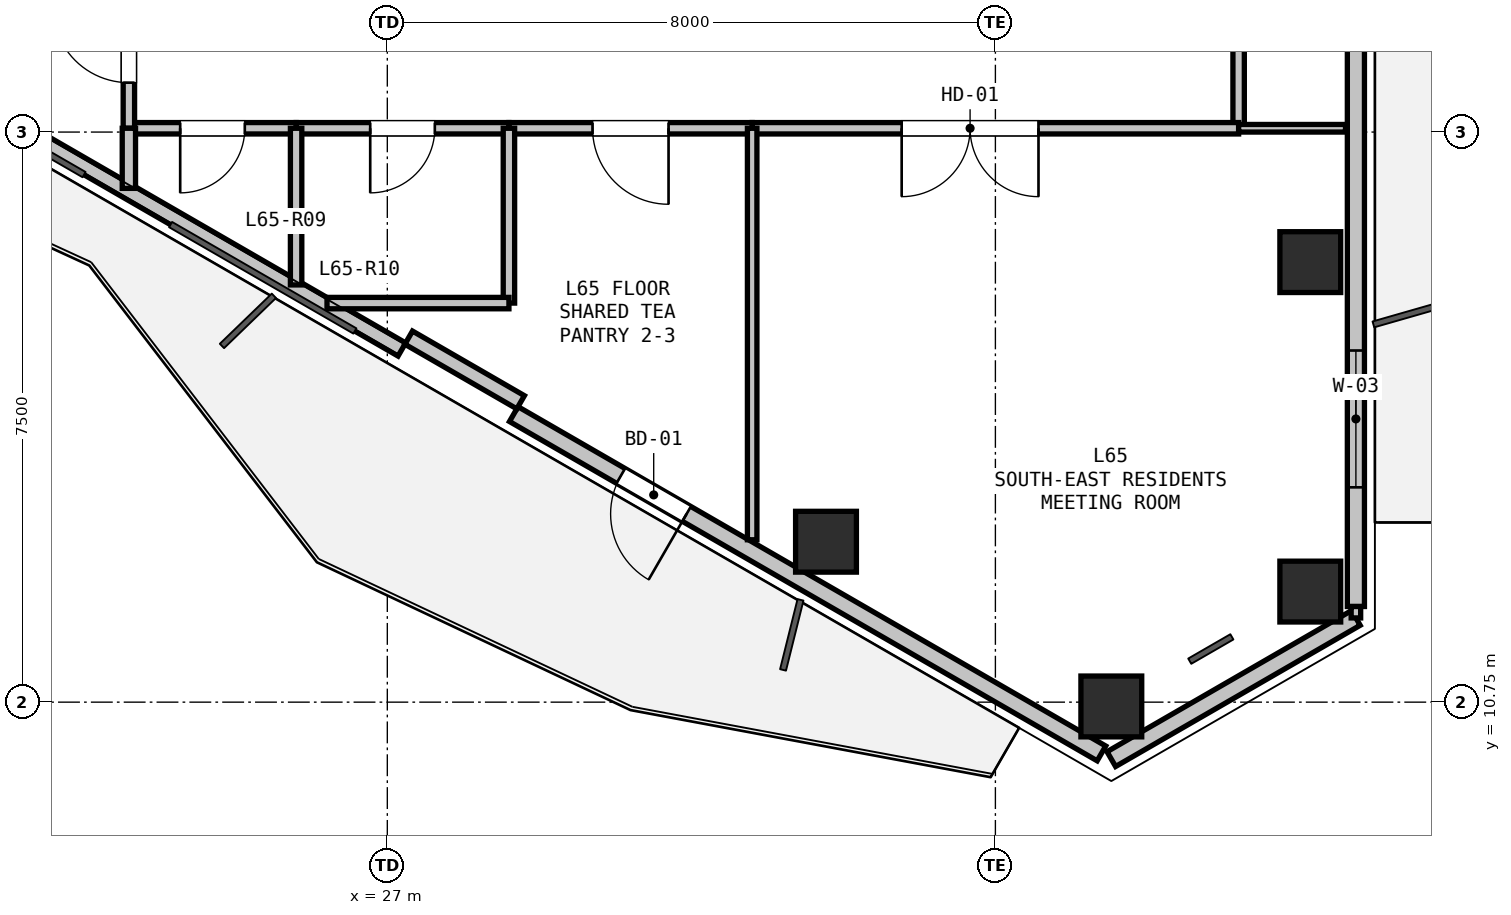
"""IFC4 building model, lengths in metres.
Left out: names, types, materials, properties, quantities, classifications, styles, units other than length and angle.
Written with IfcOpenShell. Run it as: python <this file> out.ifc"""

import sys

from ifc_helpers import new_model, si_unit, direction, frame, frame_2d, origin, origin_2d, place, context, subcontext, project, spatial, rectangle, hollow_rectangle, extrude, element, fill, save


model = new_model("IFC4")
c1 = context("Model", 3, precision=1e-05, world=origin(), true_north=direction((0.0, 1.0)))
c2 = subcontext(c1, "Body", "Model", "MODEL_VIEW")
j1 = project(units=[si_unit("LENGTHUNIT", "METRE"), si_unit("PLANEANGLEUNIT", "RADIAN")], contexts=[c1])
p1 = place(None, origin())
s1 = spatial("IfcSite", under=j1, at=p1, CompositionType="ELEMENT")
p2 = place(p1, origin())
s2 = spatial("IfcBuilding", under=s1, at=p2, CompositionType="ELEMENT")
p3 = place(p2, frame((0.0, 0.0, 233.1)))
s3 = spatial("IfcBuildingStorey", under=s2, at=p3, CompositionType="ELEMENT", Elevation=233.1)
for number, where, z_axis, x_axis in (
    (1, (39.143, 16.539, 0.0), (0.0, 0.0, 1.0), (1.0, 0.0, 0.0)),
    (2, (39.143, 12.205, 0.0), (0.0, 0.0, 1.0), (1.0, 0.0, 0.0)),
    (3, (36.525, 10.693, 0.0), (0.0, 0.0, 1.0), (1.0, 0.0, 0.0)),
    (4, (32.771, 12.861, 0.0), (0.0, 0.0, 1.0), (1.0, 0.0, 0.0)),
):
    element("IfcColumn", number, at=place(p3, frame(where, z_axis=z_axis, x_axis=x_axis)), inside=s3, PredefinedType="COLUMN", context=c2, shape_type="SweptSolid", body=[
        extrude(hollow_rectangle(XDim=0.8, YDim=0.8, WallThickness=0.025, at=origin_2d()), origin(), (0.0, 0.0, 1.0), 3.3),
    ])
p4 = place(p3, frame((39.743, 11.858, 0.0), z_axis=(0.0, 0.0, 1.0), x_axis=(-0.866038962515, -0.499976514854, 0.0)))
e5 = element("IfcWall", 5, at=p4, inside=s3, PredefinedType="SOLIDWALL", context=c2, shape_type="SweptSolid", body=[
    extrude(rectangle(XDim=3.716, YDim=0.225, at=frame_2d((1.858, 0.0))), origin(), (0.0, 0.0, 1.0), 2.7),
])
p5 = place(p3, frame((39.743, 20.936, 0.0), z_axis=(0.0, 0.0, 1.0), x_axis=(0.0, -1.0, 0.0)))
e6 = element("IfcWall", 6, at=p5, inside=s3, PredefinedType="SOLIDWALL", context=c2, shape_type="SweptSolid", body=[
    extrude(rectangle(XDim=8.928, YDim=0.225, at=frame_2d((4.464, 0.0))), origin(), (0.0, 0.0, 1.0), 2.7),
])
p6 = place(p5, frame((5.56, 0.0, 0.9)))
e7 = element("IfcOpeningElement", 7, at=p6, cuts=e6, PredefinedType="OPENING", context=c2, shape_type="SweptSolid", body=[
    extrude(rectangle(XDim=1.8, YDim=1.5, at=frame_2d((0.9, 0.75))), frame((0.0, 0.123, 0.0), z_axis=(0.0, -1.0, 0.0), x_axis=(1.0, 0.0, 0.0)), (0.0, 0.0, 1.0), 0.245),
])
p7 = place(p3, frame((36.395, 10.076, 0.0), z_axis=(0.0, 0.0, 1.0), x_axis=(-0.866026655105, 0.499997832642, 0.0)))
e8 = element("IfcWall", 8, at=p7, inside=s3, PredefinedType="SOLIDWALL", context=c2, shape_type="SweptSolid", body=[
    extrude(rectangle(XDim=8.928, YDim=0.225, at=frame_2d((4.464, 0.0))), origin(), (0.0, 0.0, 1.0), 2.7),
])
p8 = place(p7, frame((6.302, 0.0, 0.0)))
e9 = element("IfcOpeningElement", 9, at=p8, cuts=e8, PredefinedType="OPENING", context=c2, shape_type="SweptSolid", body=[
    extrude(rectangle(XDim=1.0, YDim=2.1, at=frame_2d((0.5, 1.05))), frame((0.0, 0.123, 0.0), z_axis=(0.0, -1.0, 0.0), x_axis=(1.0, 0.0, 0.0)), (0.0, 0.0, 1.0), 0.245),
])
p9 = place(p3, frame((27.191, 15.389, 0.0), z_axis=(0.0, 0.0, 1.0), x_axis=(-0.866019557082, 0.500010126649, 0.0)))
e10 = element("IfcWall", 10, at=p9, inside=s3, PredefinedType="PARAPET", context=c2, shape_type="SweptSolid", body=[
    extrude(rectangle(XDim=8.228, YDim=0.2, at=frame_2d((4.114, 0.0))), origin(), (0.0, 0.0, 1.0), 0.2),
])
p10 = place(p3, frame((28.754, 14.695, 0.0), z_axis=(0.0, 0.0, 1.0), x_axis=(-0.866025371046, 0.500000056704, 0.0)))
e11 = element("IfcWall", 11, at=p10, inside=s3, PredefinedType="PARAPET", context=c2, shape_type="SweptSolid", body=[
    extrude(rectangle(XDim=1.7, YDim=0.2, at=frame_2d((0.85, 0.0))), origin(), (0.0, 0.0, 1.0), 2.7),
])
p11 = place(p3, frame((38.2, 19.9, 0.0), z_axis=(0.0, 0.0, 1.0), x_axis=(0.0, -1.0, 0.0)))
e12 = element("IfcWall", 12, at=p11, inside=s3, PredefinedType="PARTITIONING", context=c2, shape_type="SweptSolid", body=[
    extrude(rectangle(XDim=1.6, YDim=0.15, at=frame_2d((0.8, 0.0))), origin(), (0.0, 0.0, 1.0), 3.08),
])
p12 = place(p3, frame((38.2, 18.3, 0.0), z_axis=(0.0, 0.0, 1.0), x_axis=(-1.0, 0.0, 0.0)))
e13 = element("IfcWall", 13, at=p12, inside=s3, PredefinedType="PARTITIONING", context=c2, shape_type="SweptSolid", body=[
    extrude(rectangle(XDim=6.4, YDim=0.15, at=frame_2d((3.2, 0.0))), origin(), (0.0, 0.0, 1.0), 2.528),
])
p13 = place(p12, frame((2.633, 0.0, 0.0)))
e14 = element("IfcOpeningElement", 14, at=p13, cuts=e13, PredefinedType="OPENING", context=c2, shape_type="SweptSolid", body=[
    extrude(rectangle(XDim=1.8, YDim=2.2, at=frame_2d((0.9, 1.1))), frame((0.0, 0.085, 0.0), z_axis=(0.0, -1.0, 0.0), x_axis=(1.0, 0.0, 0.0)), (0.0, 0.0, 1.0), 0.17),
])
p14 = place(p3, frame((31.8, 18.3, 0.0), z_axis=(0.0, 0.0, 1.0), x_axis=(-1.0, 0.0, 0.0)))
e15 = element("IfcWall", 15, at=p14, inside=s3, PredefinedType="PARTITIONING", context=c2, shape_type="SweptSolid", body=[
    extrude(rectangle(XDim=3.2, YDim=0.15, at=frame_2d((1.6, 0.0))), origin(), (0.0, 0.0, 1.0), 3.08),
])
p15 = place(p14, frame((1.1, 0.0, 0.0)))
e16 = element("IfcOpeningElement", 16, at=p15, cuts=e15, PredefinedType="OPENING", context=c2, shape_type="SweptSolid", body=[
    extrude(rectangle(XDim=1.0, YDim=2.15, at=frame_2d((0.5, 1.075))), frame((0.0, 0.085, 0.0), z_axis=(0.0, -1.0, 0.0), x_axis=(1.0, 0.0, 0.0)), (0.0, 0.0, 1.0), 0.17),
])
p16 = place(p3, frame((28.6, 18.3, 0.0), z_axis=(0.0, 0.0, 1.0), x_axis=(-1.0, 0.0, 0.0)))
e17 = element("IfcWall", 17, at=p16, inside=s3, PredefinedType="PARTITIONING", context=c2, shape_type="SweptSolid", body=[
    extrude(rectangle(XDim=2.8, YDim=0.15, at=frame_2d((1.4, 0.0))), origin(), (0.0, 0.0, 1.0), 3.08),
])
p17 = place(p16, frame((0.975, 0.0, 0.0)))
e18 = element("IfcOpeningElement", 18, at=p17, cuts=e17, PredefinedType="OPENING", context=c2, shape_type="SweptSolid", body=[
    extrude(rectangle(XDim=0.85, YDim=2.1, at=frame_2d((0.425, 1.05))), frame((0.0, 0.085, 0.0), z_axis=(0.0, -1.0, 0.0), x_axis=(1.0, 0.0, 0.0)), (0.0, 0.0, 1.0), 0.17),
])
p18 = place(p3, frame((25.8, 18.3, 0.0), z_axis=(0.0, 0.0, 1.0), x_axis=(-1.0, 0.0, 0.0)))
e19 = element("IfcWall", 19, at=p18, inside=s3, PredefinedType="PARTITIONING", context=c2, shape_type="SweptSolid", body=[
    extrude(rectangle(XDim=2.2, YDim=0.15, at=frame_2d((1.1, 0.0))), origin(), (0.0, 0.0, 1.0), 2.365),
])
p19 = place(p18, frame((0.675, 0.0, 0.0)))
e20 = element("IfcOpeningElement", 20, at=p19, cuts=e19, PredefinedType="OPENING", context=c2, shape_type="SweptSolid", body=[
    extrude(rectangle(XDim=0.85, YDim=2.1, at=frame_2d((0.425, 1.05))), frame((0.0, 0.085, 0.0), z_axis=(0.0, -1.0, 0.0), x_axis=(1.0, 0.0, 0.0)), (0.0, 0.0, 1.0), 0.17),
])
p20 = place(p3, frame((23.6, 18.3, 0.0), z_axis=(0.0, 0.0, 1.0), x_axis=(0.0, 1.0, 0.0)))
e21 = element("IfcWall", 21, at=p20, inside=s3, PredefinedType="PARTITIONING", context=c2, shape_type="SweptSolid", body=[
    extrude(rectangle(XDim=2.2, YDim=0.15, at=frame_2d((1.1, 0.0))), origin(), (0.0, 0.0, 1.0), 2.528),
])
p21 = place(p20, frame((0.6, 0.0, 0.0)))
e22 = element("IfcOpeningElement", 22, at=p21, cuts=e21, PredefinedType="OPENING", context=c2, shape_type="SweptSolid", body=[
    extrude(rectangle(XDim=1.0, YDim=2.15, at=frame_2d((0.5, 1.075))), frame((0.0, 0.085, 0.0), z_axis=(0.0, -1.0, 0.0), x_axis=(1.0, 0.0, 0.0)), (0.0, 0.0, 1.0), 0.17),
])
p22 = place(p3, frame((25.8, 18.3, 0.0), z_axis=(0.0, 0.0, 1.0), x_axis=(0.0, -1.0, 0.0)))
e23 = element("IfcWall", 23, at=p22, inside=s3, PredefinedType="PARTITIONING", context=c2, shape_type="SweptSolid", body=[
    extrude(rectangle(XDim=2.061, YDim=0.15, at=frame_2d((1.031, 0.0))), origin(), (0.0, 0.0, 1.0), 2.365),
])
p23 = place(p3, frame((23.6, 17.509, 0.0), z_axis=(0.0, 0.0, 1.0), x_axis=(0.0, 1.0, 0.0)))
e24 = element("IfcWall", 24, at=p23, inside=s3, PredefinedType="PLUMBINGWALL", context=c2, shape_type="SweptSolid", body=[
    extrude(rectangle(XDim=0.791, YDim=0.175, at=frame_2d((0.396, 0.0))), origin(), (0.0, 0.0, 1.0), 2.365),
])
p24 = place(p3, frame((31.8, 12.886, 0.0), z_axis=(0.0, 0.0, 1.0), x_axis=(0.0, 1.0, 0.0)))
e25 = element("IfcWall", 25, at=p24, inside=s3, PredefinedType="PARTITIONING", context=c2, shape_type="SweptSolid", body=[
    extrude(rectangle(XDim=5.414, YDim=0.125, at=frame_2d((2.707, 0.0))), origin(), (0.0, 0.0, 1.0), 2.365),
])
p25 = place(p3, frame((38.2, 18.3, 0.0), z_axis=(0.0, 0.0, 1.0), x_axis=(1.0, 0.0, 0.0)))
e26 = element("IfcWall", 26, at=p25, inside=s3, PredefinedType="PARTITIONING", context=c2, shape_type="SweptSolid", body=[
    extrude(rectangle(XDim=1.406, YDim=0.1, at=frame_2d((0.703, 0.0))), origin(), (0.0, 0.0, 1.0), 2.365),
])
p26 = place(p3, frame((39.743, 12.008, 0.0), z_axis=(0.0, 0.0, 1.0), x_axis=(0.0, -1.0, 0.0)))
e27 = element("IfcWall", 27, at=p26, inside=s3, PredefinedType="PARTITIONING", context=c2, shape_type="SweptSolid", body=[
    extrude(rectangle(XDim=0.15, YDim=0.125, at=frame_2d((0.075, 0.0))), origin(), (0.0, 0.0, 1.0), 3.08),
])
p27 = place(p3, frame((28.6, 18.3, 0.0), z_axis=(0.0, 0.0, 1.0), x_axis=(0.0, -1.0, 0.0)))
e28 = element("IfcWall", 28, at=p27, inside=s3, PredefinedType="PARTITIONING", context=c2, shape_type="SweptSolid", body=[
    extrude(rectangle(XDim=2.3, YDim=0.15, at=frame_2d((1.15, 0.0))), origin(), (0.0, 0.0, 1.0), 3.08),
])
p28 = place(p3, frame((28.6, 16.0, 0.0), z_axis=(0.0, 0.0, 1.0), x_axis=(-1.0, 0.0, 0.0)))
e29 = element("IfcWall", 29, at=p28, inside=s3, PredefinedType="PARTITIONING", context=c2, shape_type="SweptSolid", body=[
    extrude(rectangle(XDim=2.394, YDim=0.15, at=frame_2d((1.197, 0.0))), origin(), (0.0, 0.0, 1.0), 2.365),
])
p29 = place(p6, origin())
e30 = element("IfcWindow", 30, at=p29, inside=s3, PartitioningType="SINGLE_PANEL", PredefinedType="WINDOW", context=c2, shape_type="SweptSolid", body=[
    extrude(rectangle(XDim=1.8, YDim=1.5, at=frame_2d((0.9, 0.75))), frame((0.0, 0.03, 0.0), z_axis=(0.0, -1.0, 0.0), x_axis=(1.0, 0.0, 0.0)), (0.0, 0.0, 1.0), 0.06),
])
fill(e7, e30)
p30 = place(p8, origin())
e31 = element("IfcDoor", 31, at=p30, inside=s3, OperationType="SINGLE_SWING_LEFT", PredefinedType="DOOR", context=c2, shape_type="SweptSolid", body=[
    extrude(rectangle(XDim=1.0, YDim=2.1, at=frame_2d((0.5, 1.05))), frame((0.0, 0.025, 0.0), z_axis=(0.0, -1.0, 0.0), x_axis=(1.0, 0.0, 0.0)), (0.0, 0.0, 1.0), 0.05),
])
fill(e9, e31)
p31 = place(p19, origin())
e32 = element("IfcDoor", 32, at=p31, inside=s3, OperationType="SINGLE_SWING_RIGHT", PredefinedType="DOOR", context=c2, shape_type="SweptSolid", body=[
    extrude(rectangle(XDim=0.85, YDim=2.1, at=frame_2d((0.425, 1.05))), frame((0.0, 0.025, 0.0), z_axis=(0.0, -1.0, 0.0), x_axis=(1.0, 0.0, 0.0)), (0.0, 0.0, 1.0), 0.05),
])
fill(e20, e32)
p32 = place(p13, origin())
e33 = element("IfcDoor", 33, at=p32, inside=s3, OperationType="DOUBLE_DOOR_SINGLE_SWING", PredefinedType="DOOR", context=c2, shape_type="SweptSolid", body=[
    extrude(rectangle(XDim=1.8, YDim=2.2, at=frame_2d((0.9, 1.1))), frame((0.0, 0.025, 0.0), z_axis=(0.0, -1.0, 0.0), x_axis=(1.0, 0.0, 0.0)), (0.0, 0.0, 1.0), 0.05),
])
fill(e14, e33)
p33 = place(p21, origin())
e34 = element("IfcDoor", 34, at=p33, inside=s3, OperationType="SINGLE_SWING_RIGHT", PredefinedType="DOOR", context=c2, shape_type="SweptSolid", body=[
    extrude(rectangle(XDim=1.0, YDim=2.15, at=frame_2d((0.5, 1.075))), frame((0.0, 0.025, 0.0), z_axis=(0.0, -1.0, 0.0), x_axis=(1.0, 0.0, 0.0)), (0.0, 0.0, 1.0), 0.05),
])
fill(e22, e34)
p34 = place(p17, origin())
e35 = element("IfcDoor", 35, at=p34, inside=s3, OperationType="SINGLE_SWING_RIGHT", PredefinedType="DOOR", context=c2, shape_type="SweptSolid", body=[
    extrude(rectangle(XDim=0.85, YDim=2.1, at=frame_2d((0.425, 1.05))), frame((0.0, 0.025, 0.0), z_axis=(0.0, -1.0, 0.0), x_axis=(1.0, 0.0, 0.0)), (0.0, 0.0, 1.0), 0.05),
])
fill(e18, e35)
p35 = place(p15, origin())
e36 = element("IfcDoor", 36, at=p35, inside=s3, OperationType="SINGLE_SWING_LEFT", PredefinedType="DOOR", context=c2, shape_type="SweptSolid", body=[
    extrude(rectangle(XDim=1.0, YDim=2.15, at=frame_2d((0.5, 1.075))), frame((0.0, 0.025, 0.0), z_axis=(0.0, -1.0, 0.0), x_axis=(1.0, 0.0, 0.0)), (0.0, 0.0, 1.0), 0.05),
])
fill(e16, e36)
save(model, sys.argv[1])
